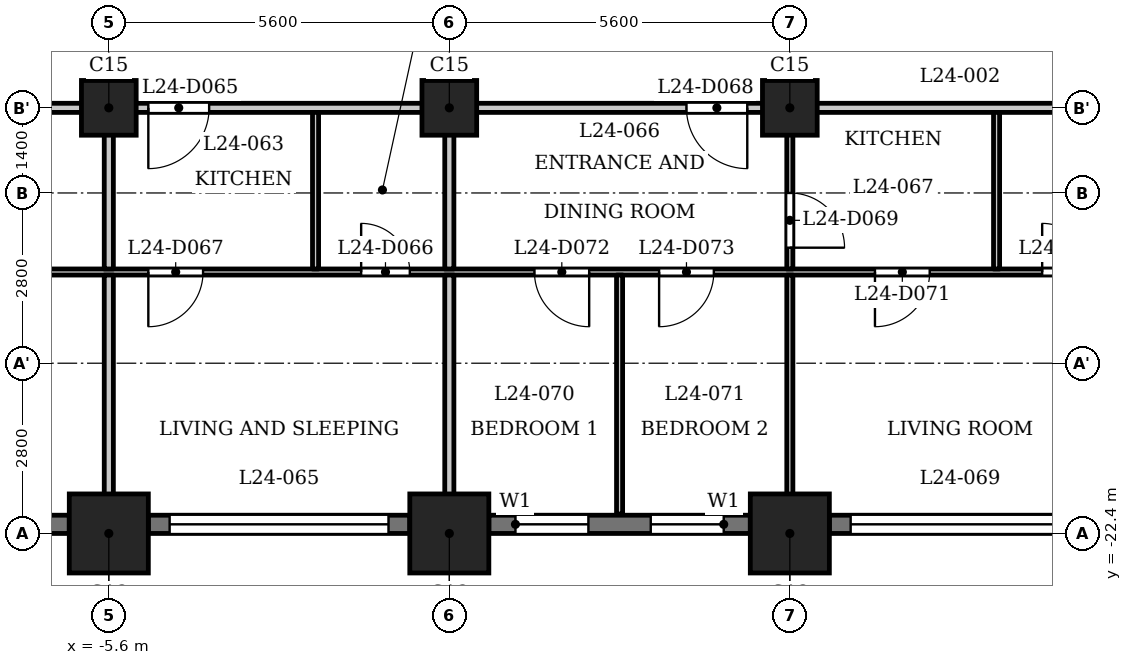
"""IFC4 building model, lengths in metres.
Left out: names, types, materials, properties, quantities, classifications, styles, units other than length and angle.
Written with IfcOpenShell. Run it as: python <this file> out.ifc"""

import sys

from ifc_helpers import new_model, si_unit, direction, frame, frame_2d, origin, origin_2d, place, context, subcontext, project, spatial, rectangle, extrude, element, fill, save


model = new_model("IFC4")
c1 = context("Model", 3, precision=1e-05, world=origin(), true_north=direction((0.0, 1.0)))
c2 = subcontext(c1, "Body", "Model", "MODEL_VIEW")
j1 = project(units=[si_unit("LENGTHUNIT", "METRE"), si_unit("PLANEANGLEUNIT", "RADIAN")], contexts=[c1])
p1 = place(None, origin())
s1 = spatial("IfcSite", under=j1, at=p1, CompositionType="ELEMENT")
p2 = place(p1, origin())
s2 = spatial("IfcBuilding", under=s1, at=p2, CompositionType="ELEMENT")
p3 = place(p2, frame((0.0, 0.0, 97.3)))
s3 = spatial("IfcBuildingStorey", under=s2, at=p3, CompositionType="ELEMENT", Elevation=97.3)
for number, where, z_axis, x_axis in (
    (1, (-5.6, -22.4, 0.0), (0.0, 0.0, 1.0), (1.0, 0.0, 0.0)),
    (2, (0.0, -22.4, 0.0), (0.0, 0.0, 1.0), (1.0, 0.0, 0.0)),
    (3, (5.6, -22.4, 0.0), (0.0, 0.0, 1.0), (1.0, 0.0, 0.0)),
):
    element("IfcColumn", number, at=place(p3, frame(where, z_axis=z_axis, x_axis=x_axis)), inside=s3, PredefinedType="COLUMN", context=c2, shape_type="SweptSolid", body=[
        extrude(rectangle(XDim=1.3, YDim=1.3, at=origin_2d()), origin(), (0.0, 0.0, 1.0), 3.5),
    ])
for number, where, z_axis, x_axis in (
    (4, (-5.6, -15.4, 0.0), (0.0, 0.0, 1.0), (1.0, 0.0, 0.0)),
    (5, (0.0, -15.4, 0.0), (0.0, 0.0, 1.0), (1.0, 0.0, 0.0)),
    (6, (5.6, -15.4, 0.0), (0.0, 0.0, 1.0), (1.0, 0.0, 0.0)),
):
    element("IfcColumn", number, at=place(p3, frame(where, z_axis=z_axis, x_axis=x_axis)), inside=s3, PredefinedType="COLUMN", context=c2, shape_type="SweptSolid", body=[
        extrude(rectangle(XDim=0.9, YDim=0.9, at=origin_2d()), origin(), (0.0, 0.0, 1.0), 3.5),
    ])
p4 = place(p3, frame((-10.55, -22.25, 0.0), z_axis=(0.0, 0.0, 1.0), x_axis=(1.0, 0.0, 0.0)))
e7 = element("IfcWall", 7, at=p4, inside=s3, PredefinedType="SOLIDWALL", context=c2, shape_type="SweptSolid", body=[
    extrude(rectangle(XDim=4.3, YDim=0.3, at=frame_2d((2.15, 0.0))), origin(), (0.0, 0.0, 1.0), 2.4),
])
p5 = place(p4, frame((0.35, 0.0, 1.2)))
e8 = element("IfcOpeningElement", 8, at=p5, cuts=e7, PredefinedType="OPENING", context=c2, shape_type="SweptSolid", body=[
    extrude(rectangle(XDim=3.6, YDim=0.95, at=frame_2d((1.8, 0.475))), frame((0.0, 0.16, 0.0), z_axis=(0.0, -1.0, 0.0), x_axis=(1.0, 0.0, 0.0)), (0.0, 0.0, 1.0), 0.32),
])
p6 = place(p3, frame((-4.95, -22.25, 0.0), z_axis=(0.0, 0.0, 1.0), x_axis=(1.0, 0.0, 0.0)))
e9 = element("IfcWall", 9, at=p6, inside=s3, PredefinedType="SOLIDWALL", context=c2, shape_type="SweptSolid", body=[
    extrude(rectangle(XDim=4.3, YDim=0.3, at=frame_2d((2.15, 0.0))), origin(), (0.0, 0.0, 1.0), 2.4),
])
p7 = place(p6, frame((0.35, 0.0, 1.2)))
e10 = element("IfcOpeningElement", 10, at=p7, cuts=e9, PredefinedType="OPENING", context=c2, shape_type="SweptSolid", body=[
    extrude(rectangle(XDim=3.6, YDim=0.95, at=frame_2d((1.8, 0.475))), frame((0.0, 0.16, 0.0), z_axis=(0.0, -1.0, 0.0), x_axis=(1.0, 0.0, 0.0)), (0.0, 0.0, 1.0), 0.32),
])
p8 = place(p3, frame((0.65, -22.25, 0.0), z_axis=(0.0, 0.0, 1.0), x_axis=(1.0, 0.0, 0.0)))
e11 = element("IfcWall", 11, at=p8, inside=s3, PredefinedType="SOLIDWALL", context=c2, shape_type="SweptSolid", body=[
    extrude(rectangle(XDim=4.3, YDim=0.3, at=frame_2d((2.15, 0.0))), origin(), (0.0, 0.0, 1.0), 2.4),
])
p9 = place(p8, frame((0.438, 0.0, 0.6)))
e12 = element("IfcOpeningElement", 12, at=p9, cuts=e11, PredefinedType="OPENING", context=c2, shape_type="SweptSolid", body=[
    extrude(rectangle(XDim=1.2, YDim=1.55, at=frame_2d((0.6, 0.775))), frame((0.0, 0.16, 0.0), z_axis=(0.0, -1.0, 0.0), x_axis=(1.0, 0.0, 0.0)), (0.0, 0.0, 1.0), 0.32),
])
p10 = place(p8, frame((2.663, 0.0, 0.6)))
e13 = element("IfcOpeningElement", 13, at=p10, cuts=e11, PredefinedType="OPENING", context=c2, shape_type="SweptSolid", body=[
    extrude(rectangle(XDim=1.2, YDim=1.55, at=frame_2d((0.6, 0.775))), frame((0.0, 0.16, 0.0), z_axis=(0.0, -1.0, 0.0), x_axis=(1.0, 0.0, 0.0)), (0.0, 0.0, 1.0), 0.32),
])
p11 = place(p3, frame((6.25, -22.25, 0.0), z_axis=(0.0, 0.0, 1.0), x_axis=(1.0, 0.0, 0.0)))
e14 = element("IfcWall", 14, at=p11, inside=s3, PredefinedType="SOLIDWALL", context=c2, shape_type="SweptSolid", body=[
    extrude(rectangle(XDim=4.3, YDim=0.3, at=frame_2d((2.15, 0.0))), origin(), (0.0, 0.0, 1.0), 2.4),
])
p12 = place(p11, frame((0.35, 0.0, 1.2)))
e15 = element("IfcOpeningElement", 15, at=p12, cuts=e14, PredefinedType="OPENING", context=c2, shape_type="SweptSolid", body=[
    extrude(rectangle(XDim=3.6, YDim=0.95, at=frame_2d((1.8, 0.475))), frame((0.0, 0.16, 0.0), z_axis=(0.0, -1.0, 0.0), x_axis=(1.0, 0.0, 0.0)), (0.0, 0.0, 1.0), 0.32),
])
p13 = place(p3, frame((-26.19, -18.1, 0.0), z_axis=(0.0, 0.0, 1.0), x_axis=(1.0, 0.0, 0.0)))
e16 = element("IfcWall", 16, at=p13, inside=s3, PredefinedType="PARTITIONING", context=c2, shape_type="SweptSolid", body=[
    extrude(rectangle(XDim=52.63, YDim=0.1, at=frame_2d((26.315, 0.0))), origin(), (0.0, 0.0, 1.0), 3.2),
])
p14 = place(p13, frame((1.09, 0.0, 0.0)))
e17 = element("IfcOpeningElement", 17, at=p14, cuts=e16, PredefinedType="OPENING", context=c2, shape_type="SweptSolid", body=[
    extrude(rectangle(XDim=0.8, YDim=2.1, at=frame_2d((0.4, 1.05))), frame((0.0, 0.06, 0.0), z_axis=(0.0, -1.0, 0.0), x_axis=(1.0, 0.0, 0.0)), (0.0, 0.0, 1.0), 0.12),
])
p15 = place(p13, frame((4.44, 0.0, 0.0)))
e18 = element("IfcOpeningElement", 18, at=p15, cuts=e16, PredefinedType="OPENING", context=c2, shape_type="SweptSolid", body=[
    extrude(rectangle(XDim=0.9, YDim=2.1, at=frame_2d((0.45, 1.05))), frame((0.0, 0.06, 0.0), z_axis=(0.0, -1.0, 0.0), x_axis=(1.0, 0.0, 0.0)), (0.0, 0.0, 1.0), 0.12),
])
p16 = place(p13, frame((10.04, 0.0, 0.0)))
e19 = element("IfcOpeningElement", 19, at=p16, cuts=e16, PredefinedType="OPENING", context=c2, shape_type="SweptSolid", body=[
    extrude(rectangle(XDim=0.8, YDim=2.1, at=frame_2d((0.4, 1.05))), frame((0.0, 0.06, 0.0), z_axis=(0.0, -1.0, 0.0), x_axis=(1.0, 0.0, 0.0)), (0.0, 0.0, 1.0), 0.12),
])
p17 = place(p13, frame((15.64, 0.0, 0.0)))
e20 = element("IfcOpeningElement", 20, at=p17, cuts=e16, PredefinedType="OPENING", context=c2, shape_type="SweptSolid", body=[
    extrude(rectangle(XDim=0.9, YDim=2.1, at=frame_2d((0.45, 1.05))), frame((0.0, 0.06, 0.0), z_axis=(0.0, -1.0, 0.0), x_axis=(1.0, 0.0, 0.0)), (0.0, 0.0, 1.0), 0.12),
])
p18 = place(p13, frame((24.74, 0.0, 0.0)))
e21 = element("IfcOpeningElement", 21, at=p18, cuts=e16, PredefinedType="OPENING", context=c2, shape_type="SweptSolid", body=[
    extrude(rectangle(XDim=0.8, YDim=2.1, at=frame_2d((0.4, 1.05))), frame((0.0, 0.06, 0.0), z_axis=(0.0, -1.0, 0.0), x_axis=(1.0, 0.0, 0.0)), (0.0, 0.0, 1.0), 0.12),
])
p19 = place(p13, frame((21.24, 0.0, 0.0)))
e22 = element("IfcOpeningElement", 22, at=p19, cuts=e16, PredefinedType="OPENING", context=c2, shape_type="SweptSolid", body=[
    extrude(rectangle(XDim=0.9, YDim=2.1, at=frame_2d((0.45, 1.05))), frame((0.0, 0.06, 0.0), z_axis=(0.0, -1.0, 0.0), x_axis=(1.0, 0.0, 0.0)), (0.0, 0.0, 1.0), 0.12),
])
p20 = place(p13, frame((35.94, 0.0, 0.0)))
e23 = element("IfcOpeningElement", 23, at=p20, cuts=e16, PredefinedType="OPENING", context=c2, shape_type="SweptSolid", body=[
    extrude(rectangle(XDim=0.8, YDim=2.1, at=frame_2d((0.4, 1.05))), frame((0.0, 0.06, 0.0), z_axis=(0.0, -1.0, 0.0), x_axis=(1.0, 0.0, 0.0)), (0.0, 0.0, 1.0), 0.12),
])
p21 = place(p13, frame((33.19, 0.0, 0.0)))
e24 = element("IfcOpeningElement", 24, at=p21, cuts=e16, PredefinedType="OPENING", context=c2, shape_type="SweptSolid", body=[
    extrude(rectangle(XDim=0.9, YDim=2.1, at=frame_2d((0.45, 1.05))), frame((0.0, 0.06, 0.0), z_axis=(0.0, -1.0, 0.0), x_axis=(1.0, 0.0, 0.0)), (0.0, 0.0, 1.0), 0.12),
])
p22 = place(p13, frame((27.59, 0.0, 0.0)))
e25 = element("IfcOpeningElement", 25, at=p22, cuts=e16, PredefinedType="OPENING", context=c2, shape_type="SweptSolid", body=[
    extrude(rectangle(XDim=0.9, YDim=2.1, at=frame_2d((0.45, 1.05))), frame((0.0, 0.06, 0.0), z_axis=(0.0, -1.0, 0.0), x_axis=(1.0, 0.0, 0.0)), (0.0, 0.0, 1.0), 0.12),
])
p23 = place(p13, frame((29.64, 0.0, 0.0)))
e26 = element("IfcOpeningElement", 26, at=p23, cuts=e16, PredefinedType="OPENING", context=c2, shape_type="SweptSolid", body=[
    extrude(rectangle(XDim=0.9, YDim=2.1, at=frame_2d((0.45, 1.05))), frame((0.0, 0.06, 0.0), z_axis=(0.0, -1.0, 0.0), x_axis=(1.0, 0.0, 0.0)), (0.0, 0.0, 1.0), 0.12),
])
p24 = place(p13, frame((41.54, 0.0, 0.0)))
e27 = element("IfcOpeningElement", 27, at=p24, cuts=e16, PredefinedType="OPENING", context=c2, shape_type="SweptSolid", body=[
    extrude(rectangle(XDim=0.8, YDim=2.1, at=frame_2d((0.4, 1.05))), frame((0.0, 0.06, 0.0), z_axis=(0.0, -1.0, 0.0), x_axis=(1.0, 0.0, 0.0)), (0.0, 0.0, 1.0), 0.12),
])
p25 = place(p13, frame((38.54, 0.0, 0.0)))
e28 = element("IfcOpeningElement", 28, at=p25, cuts=e16, PredefinedType="OPENING", context=c2, shape_type="SweptSolid", body=[
    extrude(rectangle(XDim=0.9, YDim=2.1, at=frame_2d((0.45, 1.05))), frame((0.0, 0.06, 0.0), z_axis=(0.0, -1.0, 0.0), x_axis=(1.0, 0.0, 0.0)), (0.0, 0.0, 1.0), 0.12),
])
p26 = place(p13, frame((49.204, 0.0, 0.0)))
e29 = element("IfcOpeningElement", 29, at=p26, cuts=e16, PredefinedType="OPENING", context=c2, shape_type="SweptSolid", body=[
    extrude(rectangle(XDim=0.8, YDim=2.1, at=frame_2d((0.4, 1.05))), frame((0.0, 0.06, 0.0), z_axis=(0.0, -1.0, 0.0), x_axis=(1.0, 0.0, 0.0)), (0.0, 0.0, 1.0), 0.12),
])
p27 = place(p13, frame((43.64, 0.0, 0.0)))
e30 = element("IfcOpeningElement", 30, at=p27, cuts=e16, PredefinedType="OPENING", context=c2, shape_type="SweptSolid", body=[
    extrude(rectangle(XDim=0.9, YDim=2.1, at=frame_2d((0.45, 1.05))), frame((0.0, 0.06, 0.0), z_axis=(0.0, -1.0, 0.0), x_axis=(1.0, 0.0, 0.0)), (0.0, 0.0, 1.0), 0.12),
])
p28 = place(p3, frame((-27.484, -15.4, 0.0), z_axis=(0.0, 0.0, 1.0), x_axis=(1.0, 0.0, 0.0)))
e31 = element("IfcWall", 31, at=p28, inside=s3, PredefinedType="PARTITIONING", context=c2, shape_type="SweptSolid", body=[
    extrude(rectangle(XDim=54.968, YDim=0.15, at=frame_2d((27.484, 0.0))), origin(), (0.0, 0.0, 1.0), 3.2),
])
p29 = place(p28, frame((5.734, 0.0, 0.0)))
e32 = element("IfcOpeningElement", 32, at=p29, cuts=e31, PredefinedType="OPENING", context=c2, shape_type="SweptSolid", body=[
    extrude(rectangle(XDim=1.0, YDim=2.1, at=frame_2d((0.5, 1.05))), frame((0.0, 0.085, 0.0), z_axis=(0.0, -1.0, 0.0), x_axis=(1.0, 0.0, 0.0)), (0.0, 0.0, 1.0), 0.17),
])
p30 = place(p28, frame((16.934, 0.0, 0.0)))
e33 = element("IfcOpeningElement", 33, at=p30, cuts=e31, PredefinedType="OPENING", context=c2, shape_type="SweptSolid", body=[
    extrude(rectangle(XDim=1.0, YDim=2.1, at=frame_2d((0.5, 1.05))), frame((0.0, 0.085, 0.0), z_axis=(0.0, -1.0, 0.0), x_axis=(1.0, 0.0, 0.0)), (0.0, 0.0, 1.0), 0.17),
])
p31 = place(p28, frame((22.534, 0.0, 0.0)))
e34 = element("IfcOpeningElement", 34, at=p31, cuts=e31, PredefinedType="OPENING", context=c2, shape_type="SweptSolid", body=[
    extrude(rectangle(XDim=1.0, YDim=2.1, at=frame_2d((0.5, 1.05))), frame((0.0, 0.085, 0.0), z_axis=(0.0, -1.0, 0.0), x_axis=(1.0, 0.0, 0.0)), (0.0, 0.0, 1.0), 0.17),
])
p32 = place(p28, frame((31.384, 0.0, 0.0)))
e35 = element("IfcOpeningElement", 35, at=p32, cuts=e31, PredefinedType="OPENING", context=c2, shape_type="SweptSolid", body=[
    extrude(rectangle(XDim=1.0, YDim=2.1, at=frame_2d((0.5, 1.05))), frame((0.0, 0.085, 0.0), z_axis=(0.0, -1.0, 0.0), x_axis=(1.0, 0.0, 0.0)), (0.0, 0.0, 1.0), 0.17),
])
p33 = place(p28, frame((39.584, 0.0, 0.0)))
e36 = element("IfcOpeningElement", 36, at=p33, cuts=e31, PredefinedType="OPENING", context=c2, shape_type="SweptSolid", body=[
    extrude(rectangle(XDim=1.0, YDim=2.1, at=frame_2d((0.5, 1.05))), frame((0.0, 0.085, 0.0), z_axis=(0.0, -1.0, 0.0), x_axis=(1.0, 0.0, 0.0)), (0.0, 0.0, 1.0), 0.17),
])
p34 = place(p28, frame((44.934, 0.0, 0.0)))
e37 = element("IfcOpeningElement", 37, at=p34, cuts=e31, PredefinedType="OPENING", context=c2, shape_type="SweptSolid", body=[
    extrude(rectangle(XDim=1.0, YDim=2.1, at=frame_2d((0.5, 1.05))), frame((0.0, 0.085, 0.0), z_axis=(0.0, -1.0, 0.0), x_axis=(1.0, 0.0, 0.0)), (0.0, 0.0, 1.0), 0.17),
])
p35 = place(p3, frame((-5.6, -23.03, 0.0), z_axis=(0.0, 0.0, 1.0), x_axis=(0.0, 1.0, 0.0)))
e38 = element("IfcWall", 38, at=p35, inside=s3, PredefinedType="PARTITIONING", context=c2, shape_type="SweptSolid", body=[
    extrude(rectangle(XDim=4.88, YDim=0.15, at=frame_2d((2.44, 0.0))), origin(), (0.0, 0.0, 1.0), 3.2),
])
p36 = place(p3, frame((-5.6, -18.05, 0.0), z_axis=(0.0, 0.0, 1.0), x_axis=(0.0, 1.0, 0.0)))
e39 = element("IfcWall", 39, at=p36, inside=s3, PredefinedType="PARTITIONING", context=c2, shape_type="SweptSolid", body=[
    extrude(rectangle(XDim=2.575, YDim=0.15, at=frame_2d((1.288, 0.0))), origin(), (0.0, 0.0, 1.0), 3.2),
])
p37 = place(p3, frame((-2.2, -18.05, 0.0), z_axis=(0.0, 0.0, 1.0), x_axis=(0.0, 1.0, 0.0)))
e40 = element("IfcWall", 40, at=p37, inside=s3, PredefinedType="PARTITIONING", context=c2, shape_type="SweptSolid", body=[
    extrude(rectangle(XDim=2.575, YDim=0.1, at=frame_2d((1.288, 0.0))), origin(), (0.0, 0.0, 1.0), 3.2),
])
p38 = place(p3, frame((0.0, -23.03, 0.0), z_axis=(0.0, 0.0, 1.0), x_axis=(0.0, 1.0, 0.0)))
e41 = element("IfcWall", 41, at=p38, inside=s3, PredefinedType="PARTITIONING", context=c2, shape_type="SweptSolid", body=[
    extrude(rectangle(XDim=4.88, YDim=0.15, at=frame_2d((2.44, 0.0))), origin(), (0.0, 0.0, 1.0), 3.2),
])
p39 = place(p3, frame((0.0, -18.05, 0.0), z_axis=(0.0, 0.0, 1.0), x_axis=(0.0, 1.0, 0.0)))
e42 = element("IfcWall", 42, at=p39, inside=s3, PredefinedType="PARTITIONING", context=c2, shape_type="SweptSolid", body=[
    extrude(rectangle(XDim=2.575, YDim=0.15, at=frame_2d((1.288, 0.0))), origin(), (0.0, 0.0, 1.0), 3.2),
])
p40 = place(p3, frame((2.8, -22.08, 0.0), z_axis=(0.0, 0.0, 1.0), x_axis=(0.0, 1.0, 0.0)))
e43 = element("IfcWall", 43, at=p40, inside=s3, PredefinedType="PARTITIONING", context=c2, shape_type="SweptSolid", body=[
    extrude(rectangle(XDim=3.93, YDim=0.1, at=frame_2d((1.965, 0.0))), origin(), (0.0, 0.0, 1.0), 3.2),
])
p41 = place(p3, frame((5.6, -23.03, 0.0), z_axis=(0.0, 0.0, 1.0), x_axis=(0.0, 1.0, 0.0)))
e44 = element("IfcWall", 44, at=p41, inside=s3, PredefinedType="PARTITIONING", context=c2, shape_type="SweptSolid", body=[
    extrude(rectangle(XDim=4.88, YDim=0.1, at=frame_2d((2.44, 0.0))), origin(), (0.0, 0.0, 1.0), 3.2),
])
p42 = place(p3, frame((5.6, -18.05, 0.0), z_axis=(0.0, 0.0, 1.0), x_axis=(0.0, 1.0, 0.0)))
e45 = element("IfcWall", 45, at=p42, inside=s3, PredefinedType="PARTITIONING", context=c2, shape_type="SweptSolid", body=[
    extrude(rectangle(XDim=2.575, YDim=0.1, at=frame_2d((1.288, 0.0))), origin(), (0.0, 0.0, 1.0), 3.2),
])
p43 = place(p42, frame((0.35, 0.0, 0.0)))
e46 = element("IfcOpeningElement", 46, at=p43, cuts=e45, PredefinedType="OPENING", context=c2, shape_type="SweptSolid", body=[
    extrude(rectangle(XDim=0.9, YDim=2.1, at=frame_2d((0.45, 1.05))), frame((0.0, 0.06, 0.0), z_axis=(0.0, -1.0, 0.0), x_axis=(1.0, 0.0, 0.0)), (0.0, 0.0, 1.0), 0.12),
])
p44 = place(p3, frame((9.0, -18.05, 0.0), z_axis=(0.0, 0.0, 1.0), x_axis=(0.0, 1.0, 0.0)))
e47 = element("IfcWall", 47, at=p44, inside=s3, PredefinedType="PARTITIONING", context=c2, shape_type="SweptSolid", body=[
    extrude(rectangle(XDim=2.575, YDim=0.1, at=frame_2d((1.288, 0.0))), origin(), (0.0, 0.0, 1.0), 3.2),
])
p45 = place(p31, origin())
e48 = element("IfcDoor", 48, at=p45, inside=s3, OperationType="SINGLE_SWING_LEFT", PredefinedType="DOOR", context=c2, shape_type="SweptSolid", body=[
    extrude(rectangle(XDim=1.0, YDim=2.1, at=frame_2d((0.5, 1.05))), frame((0.0, 0.025, 0.0), z_axis=(0.0, -1.0, 0.0), x_axis=(1.0, 0.0, 0.0)), (0.0, 0.0, 1.0), 0.05),
])
fill(e34, e48)
p46 = place(p18, origin())
e49 = element("IfcDoor", 49, at=p46, inside=s3, OperationType="SINGLE_SWING_RIGHT", PredefinedType="DOOR", context=c2, shape_type="SweptSolid", body=[
    extrude(rectangle(XDim=0.8, YDim=2.1, at=frame_2d((0.4, 1.05))), frame((0.0, 0.025, 0.0), z_axis=(0.0, -1.0, 0.0), x_axis=(1.0, 0.0, 0.0)), (0.0, 0.0, 1.0), 0.05),
])
fill(e21, e49)
p47 = place(p19, origin())
e50 = element("IfcDoor", 50, at=p47, inside=s3, OperationType="SINGLE_SWING_LEFT", PredefinedType="DOOR", context=c2, shape_type="SweptSolid", body=[
    extrude(rectangle(XDim=0.9, YDim=2.1, at=frame_2d((0.45, 1.05))), frame((0.0, 0.025, 0.0), z_axis=(0.0, -1.0, 0.0), x_axis=(1.0, 0.0, 0.0)), (0.0, 0.0, 1.0), 0.05),
])
fill(e22, e50)
p48 = place(p32, origin())
e51 = element("IfcDoor", 51, at=p48, inside=s3, OperationType="SINGLE_SWING_RIGHT", PredefinedType="DOOR", context=c2, shape_type="SweptSolid", body=[
    extrude(rectangle(XDim=1.0, YDim=2.1, at=frame_2d((0.5, 1.05))), frame((0.0, 0.025, 0.0), z_axis=(0.0, -1.0, 0.0), x_axis=(1.0, 0.0, 0.0)), (0.0, 0.0, 1.0), 0.05),
])
fill(e35, e51)
p49 = place(p43, origin())
e52 = element("IfcDoor", 52, at=p49, inside=s3, OperationType="SINGLE_SWING_LEFT", PredefinedType="DOOR", context=c2, shape_type="SweptSolid", body=[
    extrude(rectangle(XDim=0.9, YDim=2.1, at=frame_2d((0.45, 1.05))), frame((0.0, 0.025, 0.0), z_axis=(0.0, -1.0, 0.0), x_axis=(1.0, 0.0, 0.0)), (0.0, 0.0, 1.0), 0.05),
])
fill(e46, e52)
p50 = place(p20, origin())
e53 = element("IfcDoor", 53, at=p50, inside=s3, OperationType="SINGLE_SWING_RIGHT", PredefinedType="DOOR", context=c2, shape_type="SweptSolid", body=[
    extrude(rectangle(XDim=0.8, YDim=2.1, at=frame_2d((0.4, 1.05))), frame((0.0, 0.025, 0.0), z_axis=(0.0, -1.0, 0.0), x_axis=(1.0, 0.0, 0.0)), (0.0, 0.0, 1.0), 0.05),
])
fill(e23, e53)
p51 = place(p21, origin())
e54 = element("IfcDoor", 54, at=p51, inside=s3, OperationType="SINGLE_SWING_LEFT", PredefinedType="DOOR", context=c2, shape_type="SweptSolid", body=[
    extrude(rectangle(XDim=0.9, YDim=2.1, at=frame_2d((0.45, 1.05))), frame((0.0, 0.025, 0.0), z_axis=(0.0, -1.0, 0.0), x_axis=(1.0, 0.0, 0.0)), (0.0, 0.0, 1.0), 0.05),
])
fill(e24, e54)
p52 = place(p22, origin())
e55 = element("IfcDoor", 55, at=p52, inside=s3, OperationType="SINGLE_SWING_RIGHT", PredefinedType="DOOR", context=c2, shape_type="SweptSolid", body=[
    extrude(rectangle(XDim=0.9, YDim=2.1, at=frame_2d((0.45, 1.05))), frame((0.0, 0.025, 0.0), z_axis=(0.0, -1.0, 0.0), x_axis=(1.0, 0.0, 0.0)), (0.0, 0.0, 1.0), 0.05),
])
fill(e25, e55)
p53 = place(p23, origin())
e56 = element("IfcDoor", 56, at=p53, inside=s3, OperationType="SINGLE_SWING_LEFT", PredefinedType="DOOR", context=c2, shape_type="SweptSolid", body=[
    extrude(rectangle(XDim=0.9, YDim=2.1, at=frame_2d((0.45, 1.05))), frame((0.0, 0.025, 0.0), z_axis=(0.0, -1.0, 0.0), x_axis=(1.0, 0.0, 0.0)), (0.0, 0.0, 1.0), 0.05),
])
fill(e26, e56)
p54 = place(p7, origin())
e57 = element("IfcWindow", 57, at=p54, inside=s3, PartitioningType="SINGLE_PANEL", PredefinedType="WINDOW", context=c2, shape_type="SweptSolid", body=[
    extrude(rectangle(XDim=3.6, YDim=0.95, at=frame_2d((1.8, 0.475))), frame((0.0, 0.03, 0.0), z_axis=(0.0, -1.0, 0.0), x_axis=(1.0, 0.0, 0.0)), (0.0, 0.0, 1.0), 0.06),
])
fill(e10, e57)
p55 = place(p9, origin())
e58 = element("IfcWindow", 58, at=p55, inside=s3, PartitioningType="SINGLE_PANEL", PredefinedType="WINDOW", context=c2, shape_type="SweptSolid", body=[
    extrude(rectangle(XDim=1.2, YDim=1.55, at=frame_2d((0.6, 0.775))), frame((0.0, 0.03, 0.0), z_axis=(0.0, -1.0, 0.0), x_axis=(1.0, 0.0, 0.0)), (0.0, 0.0, 1.0), 0.06),
])
fill(e12, e58)
p56 = place(p10, origin())
e59 = element("IfcWindow", 59, at=p56, inside=s3, PartitioningType="SINGLE_PANEL", PredefinedType="WINDOW", context=c2, shape_type="SweptSolid", body=[
    extrude(rectangle(XDim=1.2, YDim=1.55, at=frame_2d((0.6, 0.775))), frame((0.0, 0.03, 0.0), z_axis=(0.0, -1.0, 0.0), x_axis=(1.0, 0.0, 0.0)), (0.0, 0.0, 1.0), 0.06),
])
fill(e13, e59)
p57 = place(p12, origin())
e60 = element("IfcWindow", 60, at=p57, inside=s3, PartitioningType="SINGLE_PANEL", PredefinedType="WINDOW", context=c2, shape_type="SweptSolid", body=[
    extrude(rectangle(XDim=3.6, YDim=0.95, at=frame_2d((1.8, 0.475))), frame((0.0, 0.03, 0.0), z_axis=(0.0, -1.0, 0.0), x_axis=(1.0, 0.0, 0.0)), (0.0, 0.0, 1.0), 0.06),
])
fill(e15, e60)
save(model, sys.argv[1])
